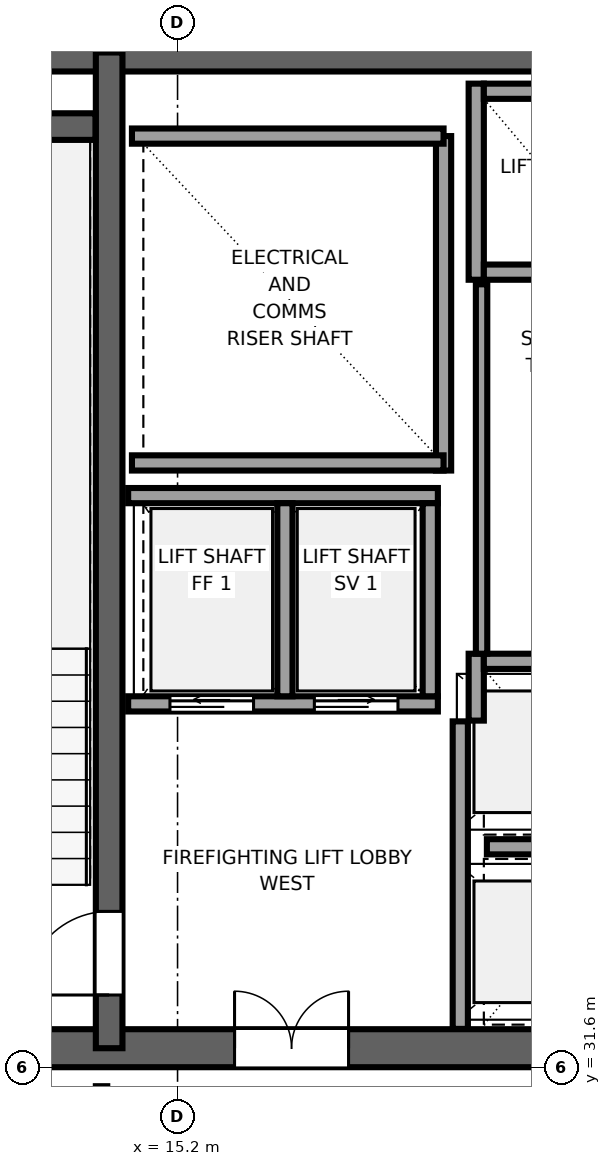
"""IFC4 building model, lengths in metres.
Left out: names, types, materials, properties, quantities, classifications, styles, units other than length and angle.
Written with IfcOpenShell. Run it as: python <this file> out.ifc"""

import sys

from ifc_helpers import new_model, si_unit, direction, frame, frame_2d, origin, place, context, subcontext, project, spatial, rectangle, extrude, source, transform, mapped, element, fill, save


model = new_model("IFC4")
c1 = context("Model", 3, precision=1e-05, world=origin(), true_north=direction((0.0, 1.0)))
c2 = subcontext(c1, "Body", "Model", "MODEL_VIEW")
j1 = project(units=[si_unit("LENGTHUNIT", "METRE"), si_unit("PLANEANGLEUNIT", "RADIAN")], contexts=[c1])
p1 = place(None, origin())
s1 = spatial("IfcSite", under=j1, at=p1, CompositionType="ELEMENT")
p2 = place(p1, origin())
s2 = spatial("IfcBuilding", under=s1, at=p2, CompositionType="ELEMENT")
p3 = place(p2, frame((0.0, 0.0, 275.05)))
s3 = spatial("IfcBuildingStorey", under=s2, at=p3, CompositionType="ELEMENT", Elevation=275.05)
p4 = place(p3, frame((10.0, 31.85, 0.0), z_axis=(0.0, 0.0, 1.0), x_axis=(1.0, 0.0, 0.0)))
e1 = element("IfcWall", 1, at=p4, inside=s3, PredefinedType="SHEAR", context=c2, shape_type="SweptSolid", body=[
    extrude(rectangle(XDim=26.0, YDim=0.5, at=frame_2d((13.0, 0.0))), origin(), (0.0, 0.0, 1.0), 3.55),
])
p5 = place(p4, frame((7.45, 0.0, 0.0), z_axis=(0.0, 0.0, 1.0), x_axis=(-1.0, 0.0, 0.0)))
e2 = element("IfcOpeningElement", 2, at=p5, cuts=e1, PredefinedType="OPENING", context=c2, shape_type="SweptSolid", body=[
    extrude(rectangle(XDim=1.5, YDim=2.04, at=frame_2d((0.75, 1.02))), frame((0.0, 0.26, 0.0), z_axis=(0.0, -1.0, 0.0), x_axis=(1.0, 0.0, 0.0)), (0.0, 0.0, 1.0), 0.52),
])
p6 = place(p4, frame((13.75, 0.0, 0.0), z_axis=(0.0, 0.0, 1.0), x_axis=(-1.0, 0.0, 0.0)))
e3 = element("IfcOpeningElement", 3, at=p6, cuts=e1, PredefinedType="OPENING", context=c2, shape_type="SweptSolid", body=[
    extrude(rectangle(XDim=1.5, YDim=2.04, at=frame_2d((0.75, 1.02))), frame((0.0, 0.26, 0.0), z_axis=(0.0, -1.0, 0.0), x_axis=(1.0, 0.0, 0.0)), (0.0, 0.0, 1.0), 0.52),
])
p7 = place(p4, frame((20.05, 0.0, 0.0), z_axis=(0.0, 0.0, 1.0), x_axis=(-1.0, 0.0, 0.0)))
e4 = element("IfcOpeningElement", 4, at=p7, cuts=e1, PredefinedType="OPENING", context=c2, shape_type="SweptSolid", body=[
    extrude(rectangle(XDim=1.5, YDim=2.04, at=frame_2d((0.75, 1.02))), frame((0.0, 0.26, 0.0), z_axis=(0.0, -1.0, 0.0), x_axis=(1.0, 0.0, 0.0)), (0.0, 0.0, 1.0), 0.52),
])
p8 = place(p3, frame((10.0, 44.95, 0.0), z_axis=(0.0, 0.0, 1.0), x_axis=(1.0, 0.0, 0.0)))
e5 = element("IfcWall", 5, at=p8, inside=s3, PredefinedType="SHEAR", context=c2, shape_type="SweptSolid", body=[
    extrude(rectangle(XDim=26.0, YDim=0.5, at=frame_2d((13.0, 0.0))), origin(), (0.0, 0.0, 1.0), 3.55),
])
p9 = place(p3, frame((14.3, 31.85, 0.0), z_axis=(0.0, 0.0, 1.0), x_axis=(0.0, 1.0, 0.0)))
e6 = element("IfcWall", 6, at=p9, inside=s3, PredefinedType="SHEAR", context=c2, shape_type="SweptSolid", body=[
    extrude(rectangle(XDim=13.1, YDim=0.35, at=frame_2d((6.55, 0.0))), origin(), (0.0, 0.0, 1.0), 3.55),
])
p10 = place(p9, frame((0.7, 0.0, 0.0)))
e7 = element("IfcOpeningElement", 7, at=p10, cuts=e6, PredefinedType="OPENING", context=c2, shape_type="SweptSolid", body=[
    extrude(rectangle(XDim=1.1, YDim=2.12, at=frame_2d((0.55, 1.06))), frame((0.0, 0.185, 0.0), z_axis=(0.0, -1.0, 0.0), x_axis=(1.0, 0.0, 0.0)), (0.0, 0.0, 1.0), 0.37),
])
p11 = place(p3, frame((10.52, 43.975, 0.0), z_axis=(0.0, 0.0, 1.0), x_axis=(1.0, 0.0, 0.0)))
e8 = element("IfcWall", 8, at=p11, inside=s3, PredefinedType="SHEAR", context=c2, shape_type="SweptSolid", body=[
    extrude(rectangle(XDim=3.6, YDim=0.35, at=frame_2d((1.8, 0.0))), origin(), (0.0, 0.0, 1.0), 3.55),
])
p12 = place(p3, frame((18.7, 39.45, 0.0), z_axis=(0.0, 0.0, 1.0), x_axis=(0.0, 1.0, 0.0)))
e9 = element("IfcWall", 9, at=p12, inside=s3, PredefinedType="SOLIDWALL", context=c2, shape_type="SweptSolid", body=[
    extrude(rectangle(XDim=4.4, YDim=0.2, at=frame_2d((2.2, 0.0))), origin(), (0.0, 0.0, 1.0), 3.33),
])
for number, where, z_axis, x_axis in (
    (10, (14.6, 39.55, 0.0), (0.0, 0.0, 1.0), (1.0, 0.0, 0.0)),
    (11, (14.6, 43.85, 0.0), (0.0, 0.0, 1.0), (1.0, 0.0, 0.0)),
):
    element("IfcWall", number, at=place(p3, frame(where, z_axis=z_axis, x_axis=x_axis)), inside=s3, PredefinedType="SOLIDWALL", context=c2, shape_type="SweptSolid", body=[
        extrude(rectangle(XDim=4.1, YDim=0.2, at=frame_2d((2.05, 0.0))), origin(), (0.0, 0.0, 1.0), 3.33),
    ])
p13 = place(p3, frame((18.92, 32.104, 0.0), z_axis=(0.0, 0.0, 1.0), x_axis=(0.0, 1.0, 0.0)))
e12 = element("IfcWall", 12, at=p13, inside=s3, PredefinedType="SOLIDWALL", context=c2, shape_type="SweptSolid", body=[
    extrude(rectangle(XDim=4.046, YDim=0.2, at=frame_2d((2.023, 0.0))), origin(), (0.0, 0.0, 1.0), 3.33),
])
p14 = place(p3, frame((19.13, 36.16, 0.0), z_axis=(0.0, 0.0, 1.0), x_axis=(0.0, 1.0, 0.0)))
e13 = element("IfcWall", 13, at=p14, inside=s3, PredefinedType="SOLIDWALL", context=c2, shape_type="SweptSolid", body=[
    extrude(rectangle(XDim=0.88, YDim=0.2, at=frame_2d((0.44, 0.0))), origin(), (0.0, 0.0, 1.0), 3.33),
])
p15 = place(p3, frame((19.23, 36.94, 0.0), z_axis=(0.0, 0.0, 1.0), x_axis=(1.0, 0.0, 0.0)))
e14 = element("IfcWall", 14, at=p15, inside=s3, PredefinedType="SOLIDWALL", context=c2, shape_type="SweptSolid", body=[
    extrude(rectangle(XDim=1.84, YDim=0.2, at=frame_2d((0.92, 0.0))), origin(), (0.0, 0.0, 1.0), 3.33),
])
p16 = place(p3, frame((19.27, 34.5, 0.0), z_axis=(0.0, 0.0, 1.0), x_axis=(1.0, 0.0, 0.0)))
e15 = element("IfcWall", 15, at=p16, inside=s3, PredefinedType="SOLIDWALL", context=c2, shape_type="SweptSolid", body=[
    extrude(rectangle(XDim=1.8, YDim=0.2, at=frame_2d((0.9, 0.0))), origin(), (0.0, 0.0, 1.0), 3.33),
])
p17 = place(p3, frame((19.13, 41.96, 0.0), z_axis=(0.0, 0.0, 1.0), x_axis=(0.0, 1.0, 0.0)))
e16 = element("IfcWall", 16, at=p17, inside=s3, PredefinedType="SOLIDWALL", context=c2, shape_type="SweptSolid", body=[
    extrude(rectangle(XDim=2.58, YDim=0.2, at=frame_2d((1.29, 0.0))), origin(), (0.0, 0.0, 1.0), 3.33),
])
for number, where, z_axis, x_axis in (
    (17, (19.23, 42.06, 0.0), (0.0, 0.0, 1.0), (1.0, 0.0, 0.0)),
    (18, (19.23, 44.44, 0.0), (0.0, 0.0, 1.0), (1.0, 0.0, 0.0)),
):
    element("IfcWall", number, at=place(p3, frame(where, z_axis=z_axis, x_axis=x_axis)), inside=s3, PredefinedType="SOLIDWALL", context=c2, shape_type="SweptSolid", body=[
        extrude(rectangle(XDim=1.84, YDim=0.2, at=frame_2d((0.92, 0.0))), origin(), (0.0, 0.0, 1.0), 3.33),
    ])
p18 = place(p3, frame((14.55, 36.38, 0.0), z_axis=(0.0, 0.0, 1.0), x_axis=(1.0, 0.0, 0.0)))
e19 = element("IfcWall", 19, at=p18, inside=s3, PredefinedType="SOLIDWALL", context=c2, shape_type="SweptSolid", body=[
    extrude(rectangle(XDim=4.075, YDim=0.2, at=frame_2d((2.038, 0.0))), origin(), (0.0, 0.0, 1.0), 3.33),
])
p19 = place(p18, frame((0.55, 0.0, 0.0)))
e20 = element("IfcOpeningElement", 20, at=p19, cuts=e19, PredefinedType="OPENING", context=c2, shape_type="SweptSolid", body=[
    extrude(rectangle(XDim=1.1, YDim=2.12, at=frame_2d((0.55, 1.06))), frame((0.0, 0.11, 0.0), z_axis=(0.0, -1.0, 0.0), x_axis=(1.0, 0.0, 0.0)), (0.0, 0.0, 1.0), 0.22),
])
p20 = place(p18, frame((2.45, 0.0, 0.0)))
e21 = element("IfcOpeningElement", 21, at=p20, cuts=e19, PredefinedType="OPENING", context=c2, shape_type="SweptSolid", body=[
    extrude(rectangle(XDim=1.1, YDim=2.12, at=frame_2d((0.55, 1.06))), frame((0.0, 0.11, 0.0), z_axis=(0.0, -1.0, 0.0), x_axis=(1.0, 0.0, 0.0)), (0.0, 0.0, 1.0), 0.22),
])
p21 = place(p3, frame((14.55, 39.12, 0.0), z_axis=(0.0, 0.0, 1.0), x_axis=(1.0, 0.0, 0.0)))
e22 = element("IfcWall", 22, at=p21, inside=s3, PredefinedType="SOLIDWALL", context=c2, shape_type="SweptSolid", body=[
    extrude(rectangle(XDim=4.075, YDim=0.2, at=frame_2d((2.038, 0.0))), origin(), (0.0, 0.0, 1.0), 3.33),
])
for number, where, z_axis, x_axis in (
    (23, (18.525, 36.48, 0.0), (0.0, 0.0, 1.0), (0.0, 1.0, 0.0)),
    (24, (16.613, 36.48, 0.0), (0.0, 0.0, 1.0), (0.0, 1.0, 0.0)),
):
    element("IfcWall", number, at=place(p3, frame(where, z_axis=z_axis, x_axis=x_axis)), inside=s3, PredefinedType="SOLIDWALL", context=c2, shape_type="SweptSolid", body=[
        extrude(rectangle(XDim=2.54, YDim=0.2, at=frame_2d((1.27, 0.0))), origin(), (0.0, 0.0, 1.0), 3.33),
    ])
p22 = place(p3, frame((19.2, 37.04, 0.0), z_axis=(0.0, 0.0, 1.0), x_axis=(0.0, 1.0, 0.0)))
e25 = element("IfcWall", 25, at=p22, inside=s3, PredefinedType="PARTITIONING", context=c2, shape_type="SweptSolid", body=[
    extrude(rectangle(XDim=4.86, YDim=0.15, at=frame_2d((2.43, 0.0))), origin(), (0.0, 0.0, 1.0), 3.33),
])
m1 = source(origin(), c2, "Body", "SweptSolid", [
    extrude(rectangle(XDim=1.1, YDim=2.12, at=frame_2d((0.55, 1.06))), frame((0.0, 0.025, 0.0), z_axis=(0.0, -1.0, 0.0), x_axis=(1.0, 0.0, 0.0)), (0.0, 0.0, 1.0), 0.05),
])
p23 = place(p10, origin())
e26 = element("IfcDoor", 26, at=p23, inside=s3, OperationType="SINGLE_SWING_LEFT", PredefinedType="DOOR", context=c2, shape_type="MappedRepresentation", body=[
    mapped(m1, transform((0.0, 0.0, 0.0), x_axis=(1.0, 0.0, 0.0), y_axis=(0.0, 1.0, 0.0), z_axis=(0.0, 0.0, 1.0), scale=1.0)),
])
fill(e7, e26)
m2 = source(origin(), c2, "Body", "SweptSolid", [
    extrude(rectangle(XDim=1.5, YDim=2.04, at=frame_2d((0.75, 1.02))), frame((0.0, 0.025, 0.0), z_axis=(0.0, -1.0, 0.0), x_axis=(1.0, 0.0, 0.0)), (0.0, 0.0, 1.0), 0.05),
])
p24 = place(p5, origin())
e27 = element("IfcDoor", 27, at=p24, inside=s3, OperationType="DOUBLE_DOOR_SINGLE_SWING", PredefinedType="DOOR", context=c2, shape_type="MappedRepresentation", body=[
    mapped(m2, transform((0.0, 0.0, 0.0), x_axis=(1.0, 0.0, 0.0), y_axis=(0.0, 1.0, 0.0), z_axis=(0.0, 0.0, 1.0), scale=1.0)),
])
fill(e2, e27)
m3 = source(origin(), c2, "Body", "SweptSolid", [
    extrude(rectangle(XDim=1.1, YDim=2.12, at=frame_2d((0.55, 1.06))), frame((0.0, 0.025, 0.0), z_axis=(0.0, -1.0, 0.0), x_axis=(1.0, 0.0, 0.0)), (0.0, 0.0, 1.0), 0.05),
])
p25 = place(p19, origin())
e28 = element("IfcDoor", 28, at=p25, inside=s3, OperationType="SLIDING_TO_LEFT", PredefinedType="DOOR", context=c2, shape_type="MappedRepresentation", body=[
    mapped(m3, transform((0.0, 0.0, 0.0), x_axis=(1.0, 0.0, 0.0), y_axis=(0.0, 1.0, 0.0), z_axis=(0.0, 0.0, 1.0), scale=1.0)),
])
fill(e20, e28)
p26 = place(p20, origin())
e29 = element("IfcDoor", 29, at=p26, inside=s3, OperationType="SLIDING_TO_RIGHT", PredefinedType="DOOR", context=c2, shape_type="MappedRepresentation", body=[
    mapped(m3, transform((0.0, 0.0, 0.0), x_axis=(1.0, 0.0, 0.0), y_axis=(0.0, 1.0, 0.0), z_axis=(0.0, 0.0, 1.0), scale=1.0)),
])
fill(e21, e29)
save(model, sys.argv[1])
